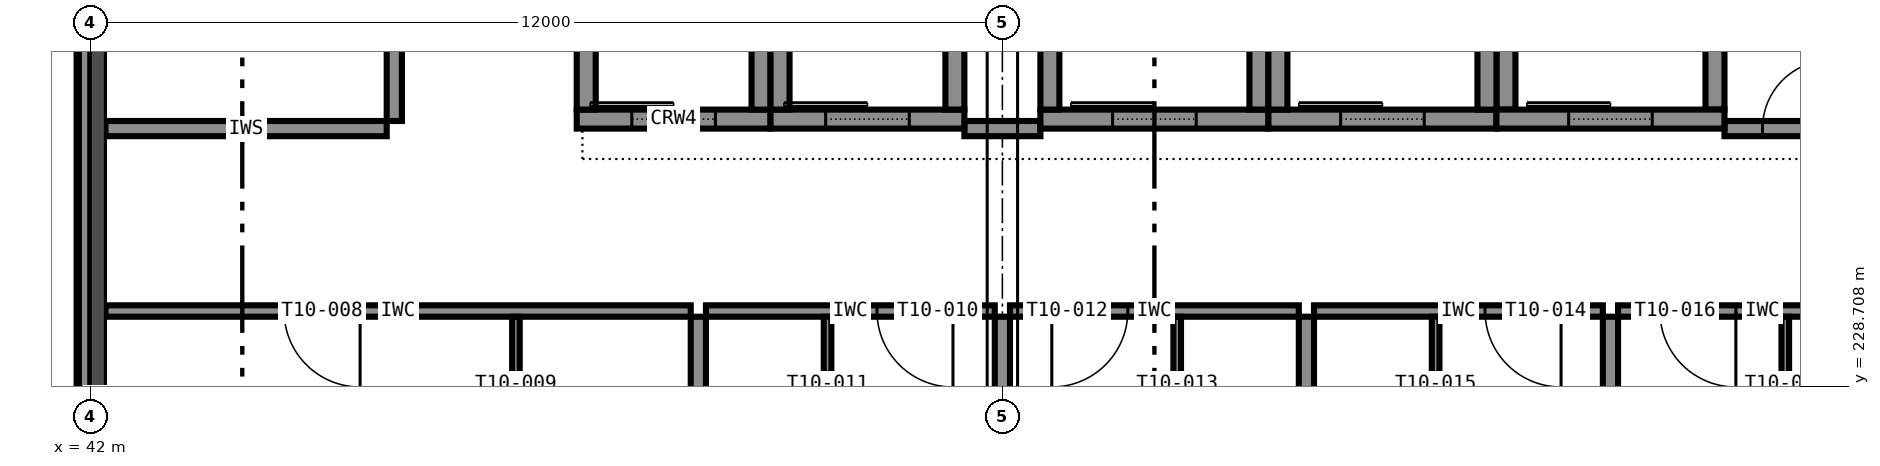
"""IFC4 building model, lengths in metres.
Left out: names, types, materials, properties, quantities, classifications, styles, units other than length and angle.
Written with IfcOpenShell. Run it as: python <this file> out.ifc"""

import sys

from ifc_helpers import new_model, si_unit, direction, frame, frame_2d, origin, place, context, subcontext, project, spatial, rectangle, extrude, element, fill, save


model = new_model("IFC4")
c1 = context("Model", 3, precision=1e-05, world=origin(), true_north=direction((0.0, 1.0)))
c2 = subcontext(c1, "Body", "Model", "MODEL_VIEW")
j1 = project(units=[si_unit("LENGTHUNIT", "METRE"), si_unit("PLANEANGLEUNIT", "RADIAN")], contexts=[c1])
p1 = place(None, origin())
s1 = spatial("IfcSite", under=j1, at=p1, CompositionType="ELEMENT")
p2 = place(p1, origin())
s2 = spatial("IfcBuilding", under=s1, at=p2, CompositionType="ELEMENT")
p3 = place(p2, frame((0.0, 0.0, 42.6)))
s3 = spatial("IfcBuildingStorey", under=s2, at=p3, CompositionType="ELEMENT", Elevation=42.6)
p4 = place(p3, frame((54.5, 232.225, 0.0), z_axis=(0.0, 0.0, 1.0), x_axis=(1.0, 0.0, 0.0)))
e1 = element("IfcWall", 1, at=p4, inside=s3, PredefinedType="SHEAR", context=c2, shape_type="SweptSolid", body=[
    extrude(rectangle(XDim=3.0, YDim=0.25, at=frame_2d((1.5, 0.0))), origin(), (0.0, 0.0, 1.0), 3.6),
])
p5 = place(p4, frame((0.95, 0.0, 0.0)))
e2 = element("IfcOpeningElement", 2, at=p5, cuts=e1, PredefinedType="OPENING", context=c2, shape_type="SweptSolid", body=[
    extrude(rectangle(XDim=1.1, YDim=2.1, at=frame_2d((0.55, 1.05))), frame((0.0, 0.135, 0.0), z_axis=(0.0, -1.0, 0.0), x_axis=(1.0, 0.0, 0.0)), (0.0, 0.0, 1.0), 0.27),
])
for number, where, z_axis, x_axis in (
    (3, (54.625, 232.35, 0.0), (0.0, 0.0, 1.0), (0.0, 1.0, 0.0)),
    (4, (57.375, 232.35, 0.0), (0.0, 0.0, 1.0), (0.0, 1.0, 0.0)),
):
    element("IfcWall", number, at=place(p3, frame(where, z_axis=z_axis, x_axis=x_axis)), inside=s3, PredefinedType="SHEAR", context=c2, shape_type="SweptSolid", body=[
        extrude(rectangle(XDim=3.3, YDim=0.25, at=frame_2d((1.65, 0.0))), origin(), (0.0, 0.0, 1.0), 3.6),
    ])
p6 = place(p3, frame((57.5, 232.225, 0.0), z_axis=(0.0, 0.0, 1.0), x_axis=(1.0, 0.0, 0.0)))
e5 = element("IfcWall", 5, at=p6, inside=s3, PredefinedType="SHEAR", context=c2, shape_type="SweptSolid", body=[
    extrude(rectangle(XDim=3.0, YDim=0.25, at=frame_2d((1.5, 0.0))), origin(), (0.0, 0.0, 1.0), 3.6),
])
p7 = place(p6, frame((0.95, 0.0, 0.0)))
e6 = element("IfcOpeningElement", 6, at=p7, cuts=e5, PredefinedType="OPENING", context=c2, shape_type="SweptSolid", body=[
    extrude(rectangle(XDim=1.1, YDim=2.1, at=frame_2d((0.55, 1.05))), frame((0.0, 0.135, 0.0), z_axis=(0.0, -1.0, 0.0), x_axis=(1.0, 0.0, 0.0)), (0.0, 0.0, 1.0), 0.27),
])
for number, where, z_axis, x_axis in (
    (7, (57.625, 232.35, 0.0), (0.0, 0.0, 1.0), (0.0, 1.0, 0.0)),
    (8, (60.375, 232.35, 0.0), (0.0, 0.0, 1.0), (0.0, 1.0, 0.0)),
):
    element("IfcWall", number, at=place(p3, frame(where, z_axis=z_axis, x_axis=x_axis)), inside=s3, PredefinedType="SHEAR", context=c2, shape_type="SweptSolid", body=[
        extrude(rectangle(XDim=3.3, YDim=0.25, at=frame_2d((1.65, 0.0))), origin(), (0.0, 0.0, 1.0), 3.6),
    ])
p8 = place(p3, frame((60.5, 232.225, 0.0), z_axis=(0.0, 0.0, 1.0), x_axis=(1.0, 0.0, 0.0)))
e9 = element("IfcWall", 9, at=p8, inside=s3, PredefinedType="SHEAR", context=c2, shape_type="SweptSolid", body=[
    extrude(rectangle(XDim=3.0, YDim=0.25, at=frame_2d((1.5, 0.0))), origin(), (0.0, 0.0, 1.0), 3.6),
])
p9 = place(p8, frame((0.95, 0.0, 0.0)))
e10 = element("IfcOpeningElement", 10, at=p9, cuts=e9, PredefinedType="OPENING", context=c2, shape_type="SweptSolid", body=[
    extrude(rectangle(XDim=1.1, YDim=2.1, at=frame_2d((0.55, 1.05))), frame((0.0, 0.135, 0.0), z_axis=(0.0, -1.0, 0.0), x_axis=(1.0, 0.0, 0.0)), (0.0, 0.0, 1.0), 0.27),
])
for number, where, z_axis, x_axis in (
    (11, (60.625, 232.35, 0.0), (0.0, 0.0, 1.0), (0.0, 1.0, 0.0)),
    (12, (63.375, 232.35, 0.0), (0.0, 0.0, 1.0), (0.0, 1.0, 0.0)),
):
    element("IfcWall", number, at=place(p3, frame(where, z_axis=z_axis, x_axis=x_axis)), inside=s3, PredefinedType="SHEAR", context=c2, shape_type="SweptSolid", body=[
        extrude(rectangle(XDim=3.3, YDim=0.25, at=frame_2d((1.65, 0.0))), origin(), (0.0, 0.0, 1.0), 3.6),
    ])
p10 = place(p3, frame((48.4, 232.225, 0.0), z_axis=(0.0, 0.0, 1.0), x_axis=(1.0, 0.0, 0.0)))
e13 = element("IfcWall", 13, at=p10, inside=s3, PredefinedType="SHEAR", context=c2, shape_type="SweptSolid", body=[
    extrude(rectangle(XDim=2.55, YDim=0.25, at=frame_2d((1.275, 0.0))), origin(), (0.0, 0.0, 1.0), 3.6),
])
p11 = place(p10, frame((0.725, 0.0, 0.0)))
e14 = element("IfcOpeningElement", 14, at=p11, cuts=e13, PredefinedType="OPENING", context=c2, shape_type="SweptSolid", body=[
    extrude(rectangle(XDim=1.1, YDim=2.1, at=frame_2d((0.55, 1.05))), frame((0.0, 0.135, 0.0), z_axis=(0.0, -1.0, 0.0), x_axis=(1.0, 0.0, 0.0)), (0.0, 0.0, 1.0), 0.27),
])
for number, where, z_axis, x_axis in (
    (15, (48.525, 232.35, 0.0), (0.0, 0.0, 1.0), (0.0, 1.0, 0.0)),
    (16, (50.825, 232.35, 0.0), (0.0, 0.0, 1.0), (0.0, 1.0, 0.0)),
):
    element("IfcWall", number, at=place(p3, frame(where, z_axis=z_axis, x_axis=x_axis)), inside=s3, PredefinedType="SHEAR", context=c2, shape_type="SweptSolid", body=[
        extrude(rectangle(XDim=3.3, YDim=0.25, at=frame_2d((1.65, 0.0))), origin(), (0.0, 0.0, 1.0), 3.6),
    ])
p12 = place(p3, frame((50.95, 232.225, 0.0), z_axis=(0.0, 0.0, 1.0), x_axis=(1.0, 0.0, 0.0)))
e17 = element("IfcWall", 17, at=p12, inside=s3, PredefinedType="SHEAR", context=c2, shape_type="SweptSolid", body=[
    extrude(rectangle(XDim=2.55, YDim=0.25, at=frame_2d((1.275, 0.0))), origin(), (0.0, 0.0, 1.0), 3.6),
])
p13 = place(p12, frame((0.725, 0.0, 0.0)))
e18 = element("IfcOpeningElement", 18, at=p13, cuts=e17, PredefinedType="OPENING", context=c2, shape_type="SweptSolid", body=[
    extrude(rectangle(XDim=1.1, YDim=2.1, at=frame_2d((0.55, 1.05))), frame((0.0, 0.135, 0.0), z_axis=(0.0, -1.0, 0.0), x_axis=(1.0, 0.0, 0.0)), (0.0, 0.0, 1.0), 0.27),
])
for number, where, z_axis, x_axis in (
    (19, (51.075, 232.35, 0.0), (0.0, 0.0, 1.0), (0.0, 1.0, 0.0)),
    (20, (53.375, 232.35, 0.0), (0.0, 0.0, 1.0), (0.0, 1.0, 0.0)),
):
    element("IfcWall", number, at=place(p3, frame(where, z_axis=z_axis, x_axis=x_axis)), inside=s3, PredefinedType="SHEAR", context=c2, shape_type="SweptSolid", body=[
        extrude(rectangle(XDim=3.3, YDim=0.25, at=frame_2d((1.65, 0.0))), origin(), (0.0, 0.0, 1.0), 3.6),
    ])
p14 = place(p3, frame((41.925, 233.6, 3.4), z_axis=(0.0, 0.0, 1.0), x_axis=(0.0, -1.0, 0.0)))
e21 = element("IfcWall", 21, at=p14, inside=s3, PredefinedType="STANDARD", context=c2, shape_type="SweptSolid", body=[
    extrude(rectangle(XDim=11.2, YDim=0.15, at=frame_2d((5.6, 0.0))), origin(), (0.0, 0.0, 1.0), 0.2),
])
p15 = place(p3, frame((42.2, 232.1, 0.0), z_axis=(0.0, 0.0, 1.0), x_axis=(1.0, 0.0, 0.0)))
e22 = element("IfcWall", 22, at=p15, inside=s3, PredefinedType="PARTITIONING", context=c2, shape_type="SweptSolid", body=[
    extrude(rectangle(XDim=3.7, YDim=0.2, at=frame_2d((1.85, 0.0))), origin(), (0.0, 0.0, 1.0), 3.4),
])
p16 = place(p3, frame((53.5, 232.1, 0.0), z_axis=(0.0, 0.0, 1.0), x_axis=(1.0, 0.0, 0.0)))
e23 = element("IfcWall", 23, at=p16, inside=s3, PredefinedType="PARTITIONING", context=c2, shape_type="SweptSolid", body=[
    extrude(rectangle(XDim=1.0, YDim=0.2, at=frame_2d((0.5, 0.0))), origin(), (0.0, 0.0, 1.0), 3.4),
])
p17 = place(p3, frame((63.5, 232.1, 0.0), z_axis=(0.0, 0.0, 1.0), x_axis=(1.0, 0.0, 0.0)))
e24 = element("IfcWall", 24, at=p17, inside=s3, PredefinedType="PARTITIONING", context=c2, shape_type="SweptSolid", body=[
    extrude(rectangle(XDim=1.9, YDim=0.2, at=frame_2d((0.95, 0.0))), origin(), (0.0, 0.0, 1.0), 3.4),
])
p18 = place(p17, frame((0.5, 0.0, 0.0)))
e25 = element("IfcOpeningElement", 25, at=p18, cuts=e24, PredefinedType="OPENING", context=c2, shape_type="SweptSolid", body=[
    extrude(rectangle(XDim=0.9, YDim=2.1, at=frame_2d((0.45, 1.05))), frame((0.0, 0.11, 0.0), z_axis=(0.0, -1.0, 0.0), x_axis=(1.0, 0.0, 0.0)), (0.0, 0.0, 1.0), 0.22),
])
p19 = place(p3, frame((46.0, 232.2, 0.0), z_axis=(0.0, 0.0, 1.0), x_axis=(0.0, 1.0, 0.0)))
e26 = element("IfcWall", 26, at=p19, inside=s3, PredefinedType="PARTITIONING", context=c2, shape_type="SweptSolid", body=[
    extrude(rectangle(XDim=3.6, YDim=0.2, at=frame_2d((1.8, 0.0))), origin(), (0.0, 0.0, 1.0), 3.4),
])
p20 = place(p19, frame((1.35, 0.0, 0.0)))
e27 = element("IfcOpeningElement", 27, at=p20, cuts=e26, PredefinedType="OPENING", context=c2, shape_type="SweptSolid", body=[
    extrude(rectangle(XDim=0.9, YDim=2.1, at=frame_2d((0.45, 1.05))), frame((0.0, 0.11, 0.0), z_axis=(0.0, -1.0, 0.0), x_axis=(1.0, 0.0, 0.0)), (0.0, 0.0, 1.0), 0.22),
])
p21 = place(p3, frame((49.9, 229.7, 0.0), z_axis=(0.0, 0.0, 1.0), x_axis=(-1.0, 0.0, 0.0)))
e28 = element("IfcWall", 28, at=p21, inside=s3, PredefinedType="PARTITIONING", context=c2, shape_type="SweptSolid", body=[
    extrude(rectangle(XDim=7.7, YDim=0.15, at=frame_2d((3.85, 0.0))), origin(), (0.0, 0.0, 1.0), 3.4),
])
p22 = place(p21, frame((4.35, 0.0, 0.0)))
e29 = element("IfcOpeningElement", 29, at=p22, cuts=e28, PredefinedType="OPENING", context=c2, shape_type="SweptSolid", body=[
    extrude(rectangle(XDim=1.0, YDim=2.1, at=frame_2d((0.5, 1.05))), frame((0.0, 0.085, 0.0), z_axis=(0.0, -1.0, 0.0), x_axis=(1.0, 0.0, 0.0)), (0.0, 0.0, 1.0), 0.17),
])
p23 = place(p3, frame((47.6, 226.75, 0.0), z_axis=(0.0, 0.0, 1.0), x_axis=(0.0, 1.0, 0.0)))
e30 = element("IfcWall", 30, at=p23, inside=s3, PredefinedType="PARTITIONING", context=c2, shape_type="SweptSolid", body=[
    extrude(rectangle(XDim=2.875, YDim=0.1, at=frame_2d((1.438, 0.0))), origin(), (0.0, 0.0, 1.0), 3.4),
])
p24 = place(p23, frame((1.038, 0.0, 0.0)))
e31 = element("IfcOpeningElement", 31, at=p24, cuts=e30, PredefinedType="OPENING", context=c2, shape_type="SweptSolid", body=[
    extrude(rectangle(XDim=0.8, YDim=2.1, at=frame_2d((0.4, 1.05))), frame((0.0, 0.06, 0.0), z_axis=(0.0, -1.0, 0.0), x_axis=(1.0, 0.0, 0.0)), (0.0, 0.0, 1.0), 0.12),
])
p25 = place(p3, frame((53.9, 229.7, 0.0), z_axis=(0.0, 0.0, 1.0), x_axis=(-1.0, 0.0, 0.0)))
e32 = element("IfcWall", 32, at=p25, inside=s3, PredefinedType="PARTITIONING", context=c2, shape_type="SweptSolid", body=[
    extrude(rectangle(XDim=3.8, YDim=0.15, at=frame_2d((1.9, 0.0))), origin(), (0.0, 0.0, 1.0), 3.4),
])
p26 = place(p25, frame((0.55, 0.0, 0.0)))
e33 = element("IfcOpeningElement", 33, at=p26, cuts=e32, PredefinedType="OPENING", context=c2, shape_type="SweptSolid", body=[
    extrude(rectangle(XDim=1.0, YDim=2.1, at=frame_2d((0.5, 1.05))), frame((0.0, 0.085, 0.0), z_axis=(0.0, -1.0, 0.0), x_axis=(1.0, 0.0, 0.0)), (0.0, 0.0, 1.0), 0.17),
])
p27 = place(p3, frame((51.7, 229.625, 0.0), z_axis=(0.0, 0.0, 1.0), x_axis=(0.0, -1.0, 0.0)))
e34 = element("IfcWall", 34, at=p27, inside=s3, PredefinedType="PARTITIONING", context=c2, shape_type="SweptSolid", body=[
    extrude(rectangle(XDim=2.875, YDim=0.1, at=frame_2d((1.438, 0.0))), origin(), (0.0, 0.0, 1.0), 3.4),
])
p28 = place(p27, frame((1.038, 0.0, 0.0)))
e35 = element("IfcOpeningElement", 35, at=p28, cuts=e34, PredefinedType="OPENING", context=c2, shape_type="SweptSolid", body=[
    extrude(rectangle(XDim=0.8, YDim=2.1, at=frame_2d((0.4, 1.05))), frame((0.0, 0.06, 0.0), z_axis=(0.0, -1.0, 0.0), x_axis=(1.0, 0.0, 0.0)), (0.0, 0.0, 1.0), 0.12),
])
p29 = place(p3, frame((57.9, 229.7, 0.0), z_axis=(0.0, 0.0, 1.0), x_axis=(-1.0, 0.0, 0.0)))
e36 = element("IfcWall", 36, at=p29, inside=s3, PredefinedType="PARTITIONING", context=c2, shape_type="SweptSolid", body=[
    extrude(rectangle(XDim=3.8, YDim=0.15, at=frame_2d((1.9, 0.0))), origin(), (0.0, 0.0, 1.0), 3.4),
])
p30 = place(p29, frame((2.25, 0.0, 0.0)))
e37 = element("IfcOpeningElement", 37, at=p30, cuts=e36, PredefinedType="OPENING", context=c2, shape_type="SweptSolid", body=[
    extrude(rectangle(XDim=1.0, YDim=2.1, at=frame_2d((0.5, 1.05))), frame((0.0, 0.085, 0.0), z_axis=(0.0, -1.0, 0.0), x_axis=(1.0, 0.0, 0.0)), (0.0, 0.0, 1.0), 0.17),
])
p31 = place(p3, frame((56.3, 226.75, 0.0), z_axis=(0.0, 0.0, 1.0), x_axis=(0.0, 1.0, 0.0)))
e38 = element("IfcWall", 38, at=p31, inside=s3, PredefinedType="PARTITIONING", context=c2, shape_type="SweptSolid", body=[
    extrude(rectangle(XDim=2.875, YDim=0.1, at=frame_2d((1.438, 0.0))), origin(), (0.0, 0.0, 1.0), 3.4),
])
p32 = place(p31, frame((1.038, 0.0, 0.0)))
e39 = element("IfcOpeningElement", 39, at=p32, cuts=e38, PredefinedType="OPENING", context=c2, shape_type="SweptSolid", body=[
    extrude(rectangle(XDim=0.8, YDim=2.1, at=frame_2d((0.4, 1.05))), frame((0.0, 0.06, 0.0), z_axis=(0.0, -1.0, 0.0), x_axis=(1.0, 0.0, 0.0)), (0.0, 0.0, 1.0), 0.12),
])
p33 = place(p3, frame((61.9, 229.7, 0.0), z_axis=(0.0, 0.0, 1.0), x_axis=(-1.0, 0.0, 0.0)))
e40 = element("IfcWall", 40, at=p33, inside=s3, PredefinedType="PARTITIONING", context=c2, shape_type="SweptSolid", body=[
    extrude(rectangle(XDim=3.8, YDim=0.15, at=frame_2d((1.9, 0.0))), origin(), (0.0, 0.0, 1.0), 3.4),
])
p34 = place(p33, frame((0.55, 0.0, 0.0)))
e41 = element("IfcOpeningElement", 41, at=p34, cuts=e40, PredefinedType="OPENING", context=c2, shape_type="SweptSolid", body=[
    extrude(rectangle(XDim=1.0, YDim=2.1, at=frame_2d((0.5, 1.05))), frame((0.0, 0.085, 0.0), z_axis=(0.0, -1.0, 0.0), x_axis=(1.0, 0.0, 0.0)), (0.0, 0.0, 1.0), 0.17),
])
p35 = place(p3, frame((59.7, 229.625, 0.0), z_axis=(0.0, 0.0, 1.0), x_axis=(0.0, -1.0, 0.0)))
e42 = element("IfcWall", 42, at=p35, inside=s3, PredefinedType="PARTITIONING", context=c2, shape_type="SweptSolid", body=[
    extrude(rectangle(XDim=2.875, YDim=0.1, at=frame_2d((1.438, 0.0))), origin(), (0.0, 0.0, 1.0), 3.4),
])
p36 = place(p35, frame((1.038, 0.0, 0.0)))
e43 = element("IfcOpeningElement", 43, at=p36, cuts=e42, PredefinedType="OPENING", context=c2, shape_type="SweptSolid", body=[
    extrude(rectangle(XDim=0.8, YDim=2.1, at=frame_2d((0.4, 1.05))), frame((0.0, 0.06, 0.0), z_axis=(0.0, -1.0, 0.0), x_axis=(1.0, 0.0, 0.0)), (0.0, 0.0, 1.0), 0.12),
])
p37 = place(p3, frame((65.9, 229.7, 0.0), z_axis=(0.0, 0.0, 1.0), x_axis=(-1.0, 0.0, 0.0)))
e44 = element("IfcWall", 44, at=p37, inside=s3, PredefinedType="PARTITIONING", context=c2, shape_type="SweptSolid", body=[
    extrude(rectangle(XDim=3.8, YDim=0.15, at=frame_2d((1.9, 0.0))), origin(), (0.0, 0.0, 1.0), 3.4),
])
p38 = place(p37, frame((2.25, 0.0, 0.0)))
e45 = element("IfcOpeningElement", 45, at=p38, cuts=e44, PredefinedType="OPENING", context=c2, shape_type="SweptSolid", body=[
    extrude(rectangle(XDim=1.0, YDim=2.1, at=frame_2d((0.5, 1.05))), frame((0.0, 0.085, 0.0), z_axis=(0.0, -1.0, 0.0), x_axis=(1.0, 0.0, 0.0)), (0.0, 0.0, 1.0), 0.17),
])
p39 = place(p3, frame((64.3, 226.75, 0.0), z_axis=(0.0, 0.0, 1.0), x_axis=(0.0, 1.0, 0.0)))
e46 = element("IfcWall", 46, at=p39, inside=s3, PredefinedType="PARTITIONING", context=c2, shape_type="SweptSolid", body=[
    extrude(rectangle(XDim=2.875, YDim=0.1, at=frame_2d((1.438, 0.0))), origin(), (0.0, 0.0, 1.0), 3.4),
])
p40 = place(p39, frame((1.038, 0.0, 0.0)))
e47 = element("IfcOpeningElement", 47, at=p40, cuts=e46, PredefinedType="OPENING", context=c2, shape_type="SweptSolid", body=[
    extrude(rectangle(XDim=0.8, YDim=2.1, at=frame_2d((0.4, 1.05))), frame((0.0, 0.06, 0.0), z_axis=(0.0, -1.0, 0.0), x_axis=(1.0, 0.0, 0.0)), (0.0, 0.0, 1.0), 0.12),
])
p41 = place(p3, frame((50.0, 222.3, 0.0), z_axis=(0.0, 0.0, 1.0), x_axis=(0.0, 1.0, 0.0)))
e48 = element("IfcWall", 48, at=p41, inside=s3, PredefinedType="PARTITIONING", context=c2, shape_type="SweptSolid", body=[
    extrude(rectangle(XDim=7.325, YDim=0.2, at=frame_2d((3.663, 0.0))), origin(), (0.0, 0.0, 1.0), 3.4),
])
p42 = place(p3, frame((54.0, 222.4, 0.0), z_axis=(0.0, 0.0, 1.0), x_axis=(0.0, 1.0, 0.0)))
e49 = element("IfcWall", 49, at=p42, inside=s3, PredefinedType="PARTITIONING", context=c2, shape_type="SweptSolid", body=[
    extrude(rectangle(XDim=7.225, YDim=0.2, at=frame_2d((3.613, 0.0))), origin(), (0.0, 0.0, 1.0), 2.6),
])
for number, where, z_axis, x_axis in (
    (50, (58.0, 222.3, 0.0), (0.0, 0.0, 1.0), (0.0, 1.0, 0.0)),
    (51, (62.0, 222.3, 0.0), (0.0, 0.0, 1.0), (0.0, 1.0, 0.0)),
):
    element("IfcWall", number, at=place(p3, frame(where, z_axis=z_axis, x_axis=x_axis)), inside=s3, PredefinedType="PARTITIONING", context=c2, shape_type="SweptSolid", body=[
        extrude(rectangle(XDim=7.325, YDim=0.2, at=frame_2d((3.663, 0.0))), origin(), (0.0, 0.0, 1.0), 3.4),
    ])
p43 = place(p18, origin())
e52 = element("IfcDoor", 52, at=p43, inside=s3, OperationType="SINGLE_SWING_RIGHT", PredefinedType="DOOR", context=c2, shape_type="SweptSolid", body=[
    extrude(rectangle(XDim=0.9, YDim=2.1, at=frame_2d((0.45, 1.05))), frame((0.0, 0.025, 0.0), z_axis=(0.0, -1.0, 0.0), x_axis=(1.0, 0.0, 0.0)), (0.0, 0.0, 1.0), 0.05),
])
fill(e25, e52)
p44 = place(p22, origin())
e53 = element("IfcDoor", 53, at=p44, inside=s3, OperationType="SINGLE_SWING_LEFT", PredefinedType="DOOR", context=c2, shape_type="SweptSolid", body=[
    extrude(rectangle(XDim=1.0, YDim=2.1, at=frame_2d((0.5, 1.05))), frame((0.0, 0.025, 0.0), z_axis=(0.0, -1.0, 0.0), x_axis=(1.0, 0.0, 0.0)), (0.0, 0.0, 1.0), 0.05),
])
fill(e29, e53)
p45 = place(p26, origin())
e54 = element("IfcDoor", 54, at=p45, inside=s3, OperationType="SINGLE_SWING_LEFT", PredefinedType="DOOR", context=c2, shape_type="SweptSolid", body=[
    extrude(rectangle(XDim=1.0, YDim=2.1, at=frame_2d((0.5, 1.05))), frame((0.0, 0.025, 0.0), z_axis=(0.0, -1.0, 0.0), x_axis=(1.0, 0.0, 0.0)), (0.0, 0.0, 1.0), 0.05),
])
fill(e33, e54)
p46 = place(p30, origin())
e55 = element("IfcDoor", 55, at=p46, inside=s3, OperationType="SINGLE_SWING_RIGHT", PredefinedType="DOOR", context=c2, shape_type="SweptSolid", body=[
    extrude(rectangle(XDim=1.0, YDim=2.1, at=frame_2d((0.5, 1.05))), frame((0.0, 0.025, 0.0), z_axis=(0.0, -1.0, 0.0), x_axis=(1.0, 0.0, 0.0)), (0.0, 0.0, 1.0), 0.05),
])
fill(e37, e55)
p47 = place(p34, origin())
e56 = element("IfcDoor", 56, at=p47, inside=s3, OperationType="SINGLE_SWING_LEFT", PredefinedType="DOOR", context=c2, shape_type="SweptSolid", body=[
    extrude(rectangle(XDim=1.0, YDim=2.1, at=frame_2d((0.5, 1.05))), frame((0.0, 0.025, 0.0), z_axis=(0.0, -1.0, 0.0), x_axis=(1.0, 0.0, 0.0)), (0.0, 0.0, 1.0), 0.05),
])
fill(e41, e56)
p48 = place(p38, origin())
e57 = element("IfcDoor", 57, at=p48, inside=s3, OperationType="SINGLE_SWING_LEFT", PredefinedType="DOOR", context=c2, shape_type="SweptSolid", body=[
    extrude(rectangle(XDim=1.0, YDim=2.1, at=frame_2d((0.5, 1.05))), frame((0.0, 0.025, 0.0), z_axis=(0.0, -1.0, 0.0), x_axis=(1.0, 0.0, 0.0)), (0.0, 0.0, 1.0), 0.05),
])
fill(e45, e57)
p49 = place(p5, origin())
e58 = element("IfcDoor", 58, at=p49, inside=s3, OperationType="SLIDING_TO_LEFT", PredefinedType="DOOR", context=c2, shape_type="SweptSolid", body=[
    extrude(rectangle(XDim=1.1, YDim=2.1, at=frame_2d((0.55, 1.05))), frame((0.0, 0.025, 0.0), z_axis=(0.0, -1.0, 0.0), x_axis=(1.0, 0.0, 0.0)), (0.0, 0.0, 1.0), 0.05),
])
fill(e2, e58)
p50 = place(p7, origin())
e59 = element("IfcDoor", 59, at=p50, inside=s3, OperationType="SLIDING_TO_LEFT", PredefinedType="DOOR", context=c2, shape_type="SweptSolid", body=[
    extrude(rectangle(XDim=1.1, YDim=2.1, at=frame_2d((0.55, 1.05))), frame((0.0, 0.025, 0.0), z_axis=(0.0, -1.0, 0.0), x_axis=(1.0, 0.0, 0.0)), (0.0, 0.0, 1.0), 0.05),
])
fill(e6, e59)
p51 = place(p9, origin())
e60 = element("IfcDoor", 60, at=p51, inside=s3, OperationType="SLIDING_TO_LEFT", PredefinedType="DOOR", context=c2, shape_type="SweptSolid", body=[
    extrude(rectangle(XDim=1.1, YDim=2.1, at=frame_2d((0.55, 1.05))), frame((0.0, 0.025, 0.0), z_axis=(0.0, -1.0, 0.0), x_axis=(1.0, 0.0, 0.0)), (0.0, 0.0, 1.0), 0.05),
])
fill(e10, e60)
p52 = place(p11, origin())
e61 = element("IfcDoor", 61, at=p52, inside=s3, OperationType="SLIDING_TO_LEFT", PredefinedType="DOOR", context=c2, shape_type="SweptSolid", body=[
    extrude(rectangle(XDim=1.1, YDim=2.1, at=frame_2d((0.55, 1.05))), frame((0.0, 0.025, 0.0), z_axis=(0.0, -1.0, 0.0), x_axis=(1.0, 0.0, 0.0)), (0.0, 0.0, 1.0), 0.05),
])
fill(e14, e61)
p53 = place(p13, origin())
e62 = element("IfcDoor", 62, at=p53, inside=s3, OperationType="SLIDING_TO_LEFT", PredefinedType="DOOR", context=c2, shape_type="SweptSolid", body=[
    extrude(rectangle(XDim=1.1, YDim=2.1, at=frame_2d((0.55, 1.05))), frame((0.0, 0.025, 0.0), z_axis=(0.0, -1.0, 0.0), x_axis=(1.0, 0.0, 0.0)), (0.0, 0.0, 1.0), 0.05),
])
fill(e18, e62)
save(model, sys.argv[1])
